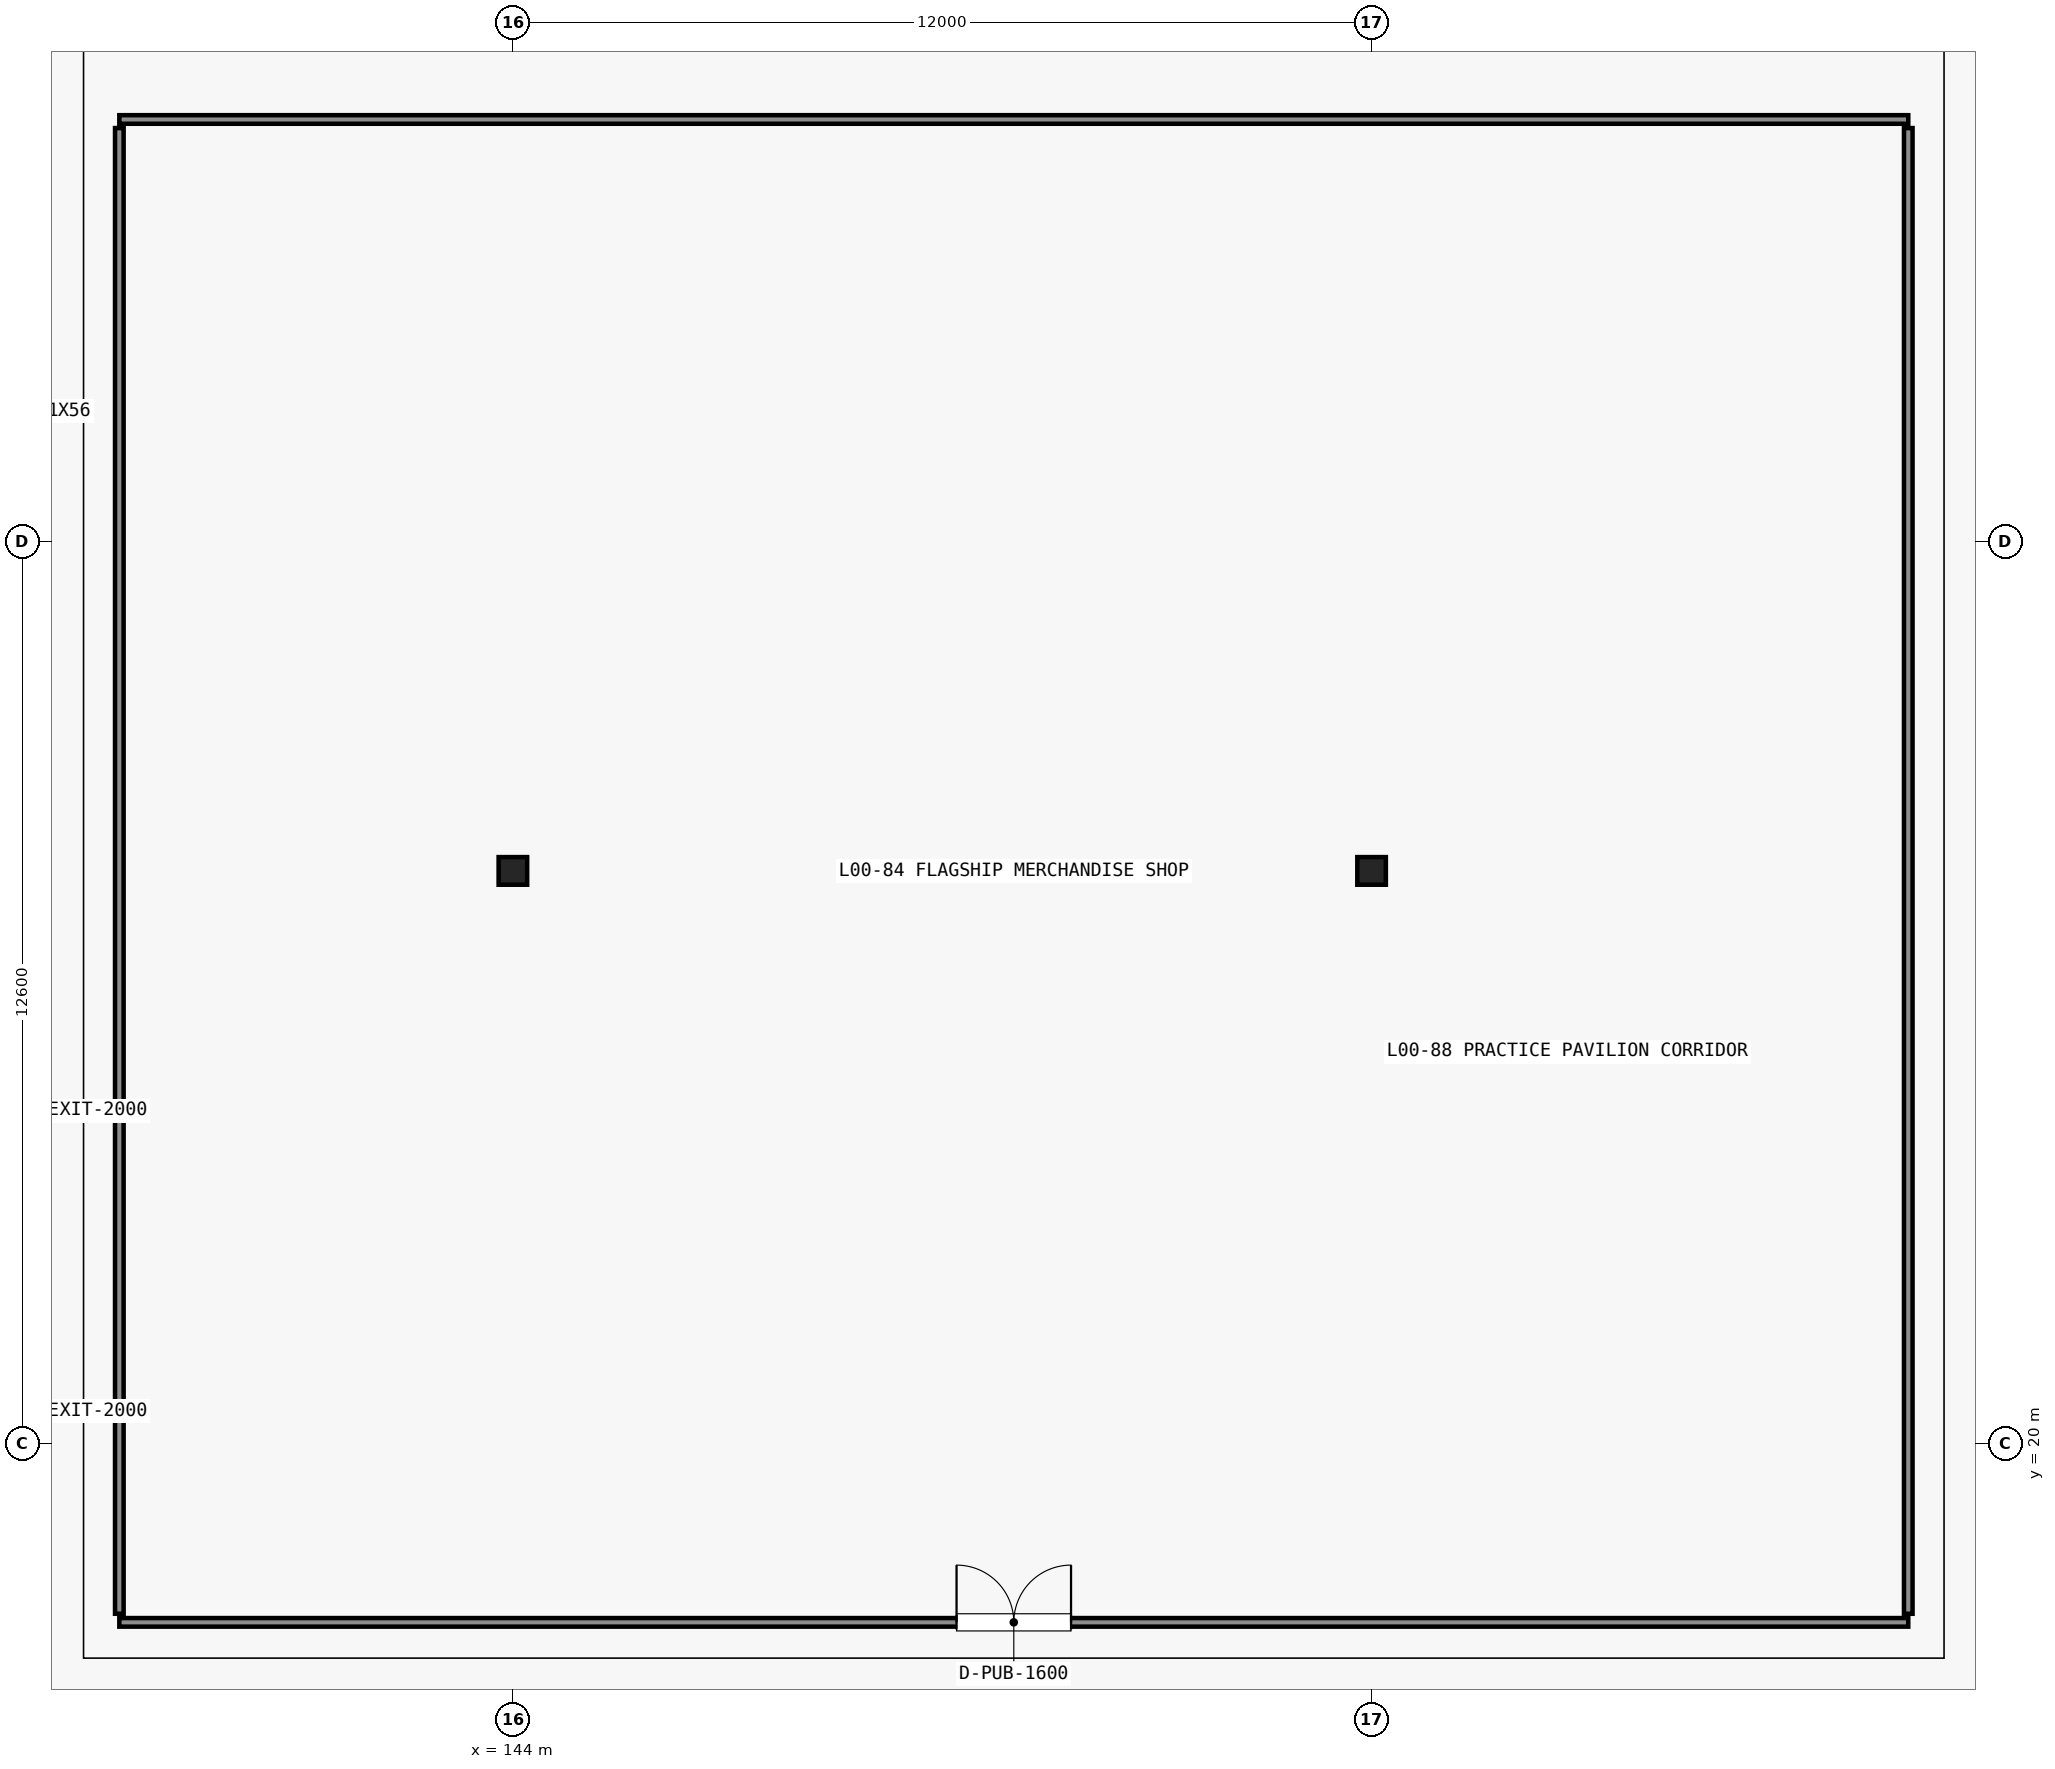
"""IFC4 building model, lengths in metres.
Left out: names, types, materials, properties, quantities, classifications, styles, units other than length and angle.
Written with IfcOpenShell. Run it as: python <this file> out.ifc"""

import sys

from ifc_helpers import new_model, si_unit, direction, frame, frame_2d, origin, origin_2d, place, context, subcontext, project, spatial, rectangle, i_section, extrude, element, fill, save


model = new_model("IFC4")
c1 = context("Model", 3, precision=1e-05, world=origin(), true_north=direction((0.0, 1.0)))
c2 = subcontext(c1, "Body", "Model", "MODEL_VIEW")
j1 = project(units=[si_unit("LENGTHUNIT", "METRE"), si_unit("PLANEANGLEUNIT", "RADIAN")], contexts=[c1])
p1 = place(None, origin())
s1 = spatial("IfcSite", under=j1, at=p1, CompositionType="ELEMENT")
p2 = place(p1, origin())
s2 = spatial("IfcBuilding", under=s1, at=p2, CompositionType="ELEMENT")
p3 = place(p2, origin())
s3 = spatial("IfcBuildingStorey", under=s2, at=p3, CompositionType="ELEMENT", Elevation=0.0)
p4 = place(p3, frame((144.0, 28.0, -0.45), z_axis=(0.0, 0.0, 1.0), x_axis=(1.0, 0.0, 0.0)))
e1 = element("IfcColumn", 1, at=p4, inside=s3, PredefinedType="COLUMN", context=c2, shape_type="SweptSolid", body=[
    extrude(i_section(OverallWidth=0.399, OverallDepth=0.386, WebThickness=0.021, FlangeThickness=0.033, FilletRadius=0.018, at=origin_2d()), origin(), (0.0, 0.0, 1.0), 6.45),
])
p5 = place(p3, frame((156.0, 28.0, -0.45), z_axis=(0.0, 0.0, 1.0), x_axis=(1.0, 0.0, 0.0)))
e2 = element("IfcColumn", 2, at=p5, inside=s3, PredefinedType="COLUMN", context=c2, shape_type="SweptSolid", body=[
    extrude(i_section(OverallWidth=0.399, OverallDepth=0.386, WebThickness=0.021, FlangeThickness=0.033, FilletRadius=0.018, at=origin_2d()), origin(), (0.0, 0.0, 1.0), 6.07),
])
p6 = place(p3, frame((138.5, 17.5, 0.0), z_axis=(0.0, 0.0, 1.0), x_axis=(1.0, 0.0, 0.0)))
e3 = element("IfcWall", 3, at=p6, inside=s3, PredefinedType="PARTITIONING", context=c2, shape_type="SweptSolid", body=[
    extrude(rectangle(XDim=25.0, YDim=0.12, at=frame_2d((12.5, 0.0))), origin(), (0.0, 0.0, 1.0), 4.927),
])
p7 = place(p6, frame((11.7, 0.0, 0.0)))
e4 = element("IfcOpeningElement", 4, at=p7, cuts=e3, PredefinedType="OPENING", context=c2, shape_type="SweptSolid", body=[
    extrude(rectangle(XDim=1.6, YDim=2.25, at=frame_2d((0.8, 1.125))), frame((0.0, 0.07, 0.0), z_axis=(0.0, -1.0, 0.0), x_axis=(1.0, 0.0, 0.0)), (0.0, 0.0, 1.0), 0.14),
])
p8 = place(p3, frame((138.5, 38.5, 0.0), z_axis=(0.0, 0.0, 1.0), x_axis=(1.0, 0.0, 0.0)))
e5 = element("IfcWall", 5, at=p8, inside=s3, PredefinedType="PARTITIONING", context=c2, shape_type="SweptSolid", body=[
    extrude(rectangle(XDim=25.0, YDim=0.12, at=frame_2d((12.5, 0.0))), origin(), (0.0, 0.0, 1.0), 4.927),
])
for number, where, z_axis, x_axis in (
    (6, (138.5, 17.62, 0.0), (0.0, 0.0, 1.0), (0.0, 1.0, 0.0)),
    (7, (163.5, 17.62, 0.0), (0.0, 0.0, 1.0), (0.0, 1.0, 0.0)),
):
    element("IfcWall", number, at=place(p3, frame(where, z_axis=z_axis, x_axis=x_axis)), inside=s3, PredefinedType="PARTITIONING", context=c2, shape_type="SweptSolid", body=[
        extrude(rectangle(XDim=20.76, YDim=0.12, at=frame_2d((10.38, 0.0))), origin(), (0.0, 0.0, 1.0), 4.927),
    ])
p9 = place(p7, origin())
e8 = element("IfcDoor", 8, at=p9, inside=s3, OperationType="DOUBLE_DOOR_SINGLE_SWING", PredefinedType="DOOR", context=c2, shape_type="SweptSolid", body=[
    extrude(rectangle(XDim=1.6, YDim=2.25, at=frame_2d((0.8, 1.125))), frame((0.0, 0.025, 0.0), z_axis=(0.0, -1.0, 0.0), x_axis=(1.0, 0.0, 0.0)), (0.0, 0.0, 1.0), 0.05),
])
fill(e4, e8)
save(model, sys.argv[1])
